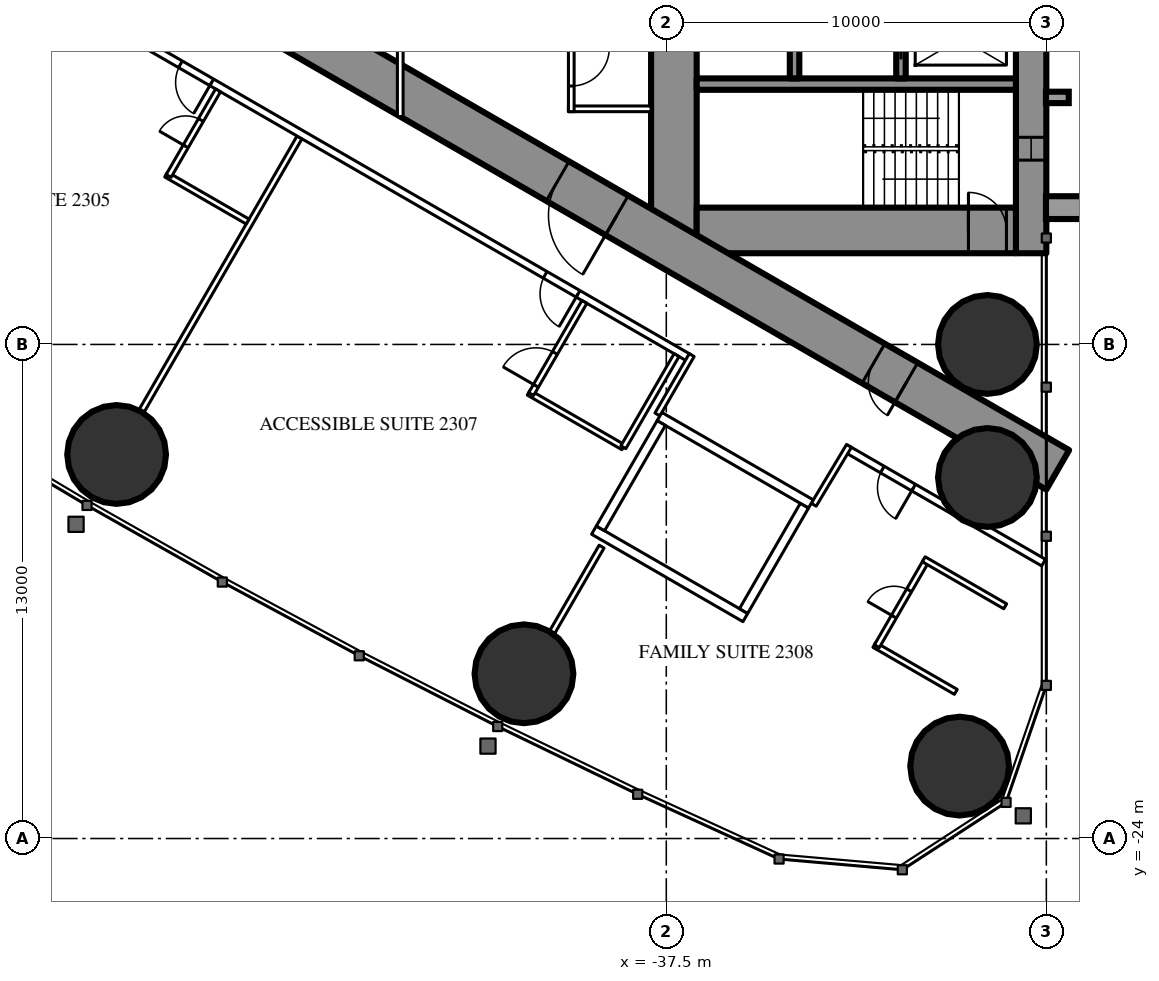
"""IFC4 building model, lengths in metres.
Left out: names, types, materials, properties, quantities, classifications, styles, units other than length and angle.
Written with IfcOpenShell. Run it as: python <this file> out.ifc"""

import sys

from ifc_helpers import new_model, si_unit, direction, frame, frame_2d, origin, origin_2d, place, context, subcontext, project, spatial, rectangle, hollow_circle, extrude, element, fill, save


model = new_model("IFC4")
c1 = context("Model", 3, precision=1e-05, world=origin(), true_north=direction((0.0, 1.0)))
c2 = subcontext(c1, "Body", "Model", "MODEL_VIEW")
j1 = project(units=[si_unit("LENGTHUNIT", "METRE"), si_unit("PLANEANGLEUNIT", "RADIAN")], contexts=[c1])
p1 = place(None, origin())
s1 = spatial("IfcSite", under=j1, at=p1, CompositionType="ELEMENT")
p2 = place(p1, origin())
s2 = spatial("IfcBuilding", under=s1, at=p2, CompositionType="ELEMENT")
p3 = place(p2, frame((0.0, 0.0, 90.6)))
s3 = spatial("IfcBuildingStorey", under=s2, at=p3, CompositionType="ELEMENT", Elevation=90.6)
for number, where, z_axis, x_axis in (
    (1, (-29.781, -22.095, 0.0), (0.0, 0.0, 1.0), (1.0, 0.0, 0.0)),
    (2, (-29.05, -11.0, 0.0), (0.0, 0.0, 1.0), (1.0, 0.0, 0.0)),
    (3, (-29.05, -14.5, 0.0), (0.0, 0.0, 1.0), (1.0, 0.0, 0.0)),
    (4, (-51.963, -13.895, 0.0), (0.0, 0.0, 1.0), (1.0, 0.0, 0.0)),
    (5, (-41.245, -19.666, 0.0), (0.0, 0.0, 1.0), (1.0, 0.0, 0.0)),
):
    element("IfcColumn", number, at=place(p3, frame(where, z_axis=z_axis, x_axis=x_axis)), inside=s3, PredefinedType="COLUMN", context=c2, shape_type="SweptSolid", body=[
        extrude(hollow_circle(Radius=1.3, WallThickness=0.1, at=origin_2d()), origin(), (0.0, 0.0, 1.0), 3.5),
    ])
p4 = place(p3, frame((-27.9, 8.6, 0.0), z_axis=(0.0, 0.0, 1.0), x_axis=(0.0, -1.0, 0.0)))
e6 = element("IfcWall", 6, at=p4, inside=s3, PredefinedType="SHEAR", context=c2, shape_type="SweptSolid", body=[
    extrude(rectangle(XDim=17.2, YDim=0.8, at=frame_2d((8.6, 0.0))), origin(), (0.0, 0.0, 1.0), 3.5),
])
p5 = place(p4, frame((2.45, 0.0, 0.6)))
e7 = element("IfcOpeningElement", 7, at=p5, cuts=e6, PredefinedType="OPENING", context=c2, shape_type="SweptSolid", body=[
    extrude(rectangle(XDim=0.6, YDim=2.1, at=frame_2d((0.3, 1.05))), frame((0.0, 0.41, 0.0), z_axis=(0.0, -1.0, 0.0), x_axis=(1.0, 0.0, 0.0)), (0.0, 0.0, 1.0), 0.82),
])
p6 = place(p4, frame((14.15, 0.0, 0.6)))
e8 = element("IfcOpeningElement", 8, at=p6, cuts=e6, PredefinedType="OPENING", context=c2, shape_type="SweptSolid", body=[
    extrude(rectangle(XDim=0.6, YDim=2.1, at=frame_2d((0.3, 1.05))), frame((0.0, 0.41, 0.0), z_axis=(0.0, -1.0, 0.0), x_axis=(1.0, 0.0, 0.0)), (0.0, 0.0, 1.0), 0.82),
])
p7 = place(p3, frame((-37.3, 8.6, 0.0), z_axis=(0.0, 0.0, 1.0), x_axis=(0.0, -1.0, 0.0)))
e9 = element("IfcWall", 9, at=p7, inside=s3, PredefinedType="SHEAR", context=c2, shape_type="SweptSolid", body=[
    extrude(rectangle(XDim=17.2, YDim=1.2, at=frame_2d((8.6, 0.0))), origin(), (0.0, 0.0, 1.0), 3.5),
])
p8 = place(p7, frame((7.7, 0.0, 0.0)))
e10 = element("IfcOpeningElement", 10, at=p8, cuts=e9, PredefinedType="OPENING", context=c2, shape_type="SweptSolid", body=[
    extrude(rectangle(XDim=1.8, YDim=2.2, at=frame_2d((0.9, 1.1))), frame((0.0, 0.61, 0.0), z_axis=(0.0, -1.0, 0.0), x_axis=(1.0, 0.0, 0.0)), (0.0, 0.0, 1.0), 1.22),
])
p9 = place(p3, frame((-28.3, -8.0, 0.0), z_axis=(0.0, 0.0, 1.0), x_axis=(-1.0, 0.0, 0.0)))
e11 = element("IfcWall", 11, at=p9, inside=s3, PredefinedType="SHEAR", context=c2, shape_type="SweptSolid", body=[
    extrude(rectangle(XDim=8.4, YDim=1.2, at=frame_2d((4.2, 0.0))), origin(), (0.0, 0.0, 1.0), 3.5),
])
p10 = place(p9, frame((0.25, 0.0, 0.0)))
e12 = element("IfcOpeningElement", 12, at=p10, cuts=e11, PredefinedType="OPENING", context=c2, shape_type="SweptSolid", body=[
    extrude(rectangle(XDim=1.0, YDim=2.2, at=frame_2d((0.5, 1.1))), frame((0.0, 0.61, 0.0), z_axis=(0.0, -1.0, 0.0), x_axis=(1.0, 0.0, 0.0)), (0.0, 0.0, 1.0), 1.22),
])
p11 = place(p3, frame((-28.3, -4.15, 0.0), z_axis=(0.0, 0.0, 1.0), x_axis=(-1.0, 0.0, 0.0)))
e13 = element("IfcWall", 13, at=p11, inside=s3, PredefinedType="SHEAR", context=c2, shape_type="SweptSolid", body=[
    extrude(rectangle(XDim=8.4, YDim=0.3, at=frame_2d((4.2, 0.0))), origin(), (0.0, 0.0, 1.0), 3.5),
])
p12 = place(p3, frame((-31.325, -1.9, 0.0), z_axis=(0.0, 0.0, 1.0), x_axis=(0.0, -1.0, 0.0)))
e14 = element("IfcWall", 14, at=p12, inside=s3, PredefinedType="SHEAR", context=c2, shape_type="SweptSolid", body=[
    extrude(rectangle(XDim=2.1, YDim=0.25, at=frame_2d((1.05, 0.0))), origin(), (0.0, 0.0, 1.0), 3.5),
])
p13 = place(p12, frame((0.5, 0.0, 0.0)))
e15 = element("IfcOpeningElement", 15, at=p13, cuts=e14, PredefinedType="OPENING", context=c2, shape_type="SweptSolid", body=[
    extrude(rectangle(XDim=1.1, YDim=2.2, at=frame_2d((0.55, 1.1))), frame((0.0, 0.135, 0.0), z_axis=(0.0, -1.0, 0.0), x_axis=(1.0, 0.0, 0.0)), (0.0, 0.0, 1.0), 0.27),
])
p14 = place(p3, frame((-34.125, -1.65, 0.0), z_axis=(0.0, 0.0, 1.0), x_axis=(0.0, -1.0, 0.0)))
e16 = element("IfcWall", 16, at=p14, inside=s3, PredefinedType="SHEAR", context=c2, shape_type="SweptSolid", body=[
    extrude(rectangle(XDim=2.35, YDim=0.25, at=frame_2d((1.175, 0.0))), origin(), (0.0, 0.0, 1.0), 3.5),
])
p15 = place(p14, frame((0.875, 0.0, 0.0)))
e17 = element("IfcOpeningElement", 17, at=p15, cuts=e16, PredefinedType="OPENING", context=c2, shape_type="SweptSolid", body=[
    extrude(rectangle(XDim=0.6, YDim=2.0, at=frame_2d((0.3, 1.0))), frame((0.0, 0.135, 0.0), z_axis=(0.0, -1.0, 0.0), x_axis=(1.0, 0.0, 0.0)), (0.0, 0.0, 1.0), 0.27),
])
p16 = place(p3, frame((-27.2, -14.3, 0.0), z_axis=(0.0, 0.0, 1.0), x_axis=(-0.866024021859, 0.500002393557, 0.0)))
e18 = element("IfcWall", 18, at=p16, inside=s3, PredefinedType="SHEAR", context=c2, shape_type="SweptSolid", body=[
    extrude(rectangle(XDim=27.907, YDim=1.2, at=frame_2d((13.954, 0.0))), origin(), (0.0, 0.0, 1.0), 3.5),
])
p17 = place(p16, frame((4.6, 0.0, 0.0)))
e19 = element("IfcOpeningElement", 19, at=p17, cuts=e18, PredefinedType="OPENING", context=c2, shape_type="SweptSolid", body=[
    extrude(rectangle(XDim=1.0, YDim=2.2, at=frame_2d((0.5, 1.1))), frame((0.0, 0.61, 0.0), z_axis=(0.0, -1.0, 0.0), x_axis=(1.0, 0.0, 0.0)), (0.0, 0.0, 1.0), 1.22),
])
p18 = place(p16, frame((13.395, 0.0, 0.0)))
e20 = element("IfcOpeningElement", 20, at=p18, cuts=e18, PredefinedType="OPENING", context=c2, shape_type="SweptSolid", body=[
    extrude(rectangle(XDim=1.8, YDim=2.2, at=frame_2d((0.9, 1.1))), frame((0.0, 0.61, 0.0), z_axis=(0.0, -1.0, 0.0), x_axis=(1.0, 0.0, 0.0)), (0.0, 0.0, 1.0), 1.22),
])
p19 = place(p3, frame((-47.151, -5.552, 0.0), z_axis=(0.0, 0.0, 1.0), x_axis=(-0.500003012045, -0.866023664773, 0.0)))
e21 = element("IfcWall", 21, at=p19, inside=s3, PredefinedType="PARTITIONING", context=c2, shape_type="SweptSolid", body=[
    extrude(rectangle(XDim=8.311, YDim=0.15, at=frame_2d((4.156, 0.0))), origin(), (0.0, 0.0, 1.0), 2.2),
])
p20 = place(p3, frame((-39.202, -16.32, 0.0), z_axis=(0.0, 0.0, 1.0), x_axis=(-0.49997716683, -0.86603858612, 0.0)))
e22 = element("IfcWall", 22, at=p20, inside=s3, PredefinedType="PARTITIONING", context=c2, shape_type="SweptSolid", body=[
    extrude(rectangle(XDim=2.6, YDim=0.15, at=frame_2d((1.3, 0.0))), origin(), (0.0, 0.0, 1.0), 3.25),
])
p21 = place(p3, frame((-27.572, -16.741, 0.0), z_axis=(0.0, 0.0, 1.0), x_axis=(-0.866024464444, 0.500001626982, 0.0)))
e23 = element("IfcWall", 23, at=p21, inside=s3, PredefinedType="PARTITIONING", context=c2, shape_type="SweptSolid", body=[
    extrude(rectangle(XDim=5.955, YDim=0.2, at=frame_2d((2.978, 0.0))), origin(), (0.0, 0.0, 1.0), 3.25),
])
p22 = place(p21, frame((3.95, 0.0, 0.0)))
e24 = element("IfcOpeningElement", 24, at=p22, cuts=e23, PredefinedType="OPENING", context=c2, shape_type="SweptSolid", body=[
    extrude(rectangle(XDim=0.95, YDim=2.2, at=frame_2d((0.475, 1.1))), frame((0.0, 0.11, 0.0), z_axis=(0.0, -1.0, 0.0), x_axis=(1.0, 0.0, 0.0)), (0.0, 0.0, 1.0), 0.22),
])
p23 = place(p3, frame((-36.92, -11.344, 0.0), z_axis=(0.0, 0.0, 1.0), x_axis=(-0.866028313256, 0.499994960614, 0.0)))
e25 = element("IfcWall", 25, at=p23, inside=s3, PredefinedType="PARTITIONING", context=c2, shape_type="SweptSolid", body=[
    extrude(rectangle(XDim=22.568, YDim=0.2, at=frame_2d((11.284, 0.0))), origin(), (0.0, 0.0, 1.0), 3.25),
])
p24 = place(p23, frame((14.481, 0.0, 0.0)))
e26 = element("IfcOpeningElement", 26, at=p24, cuts=e25, PredefinedType="OPENING", context=c2, shape_type="SweptSolid", body=[
    extrude(rectangle(XDim=0.95, YDim=2.2, at=frame_2d((0.475, 1.1))), frame((0.0, 0.11, 0.0), z_axis=(0.0, -1.0, 0.0), x_axis=(1.0, 0.0, 0.0)), (0.0, 0.0, 1.0), 0.22),
])
p25 = place(p23, frame((3.35, 0.0, 0.0)))
e27 = element("IfcOpeningElement", 27, at=p25, cuts=e25, PredefinedType="OPENING", context=c2, shape_type="SweptSolid", body=[
    extrude(rectangle(XDim=1.0, YDim=2.2, at=frame_2d((0.5, 1.1))), frame((0.0, 0.11, 0.0), z_axis=(0.0, -1.0, 0.0), x_axis=(1.0, 0.0, 0.0)), (0.0, 0.0, 1.0), 0.22),
])
p26 = place(p3, frame((-36.831, -11.28, 0.0), z_axis=(0.0, 0.0, 1.0), x_axis=(-0.499937177781, -0.866061671171, 0.0)))
e28 = element("IfcWall", 28, at=p26, inside=s3, PredefinedType="PARTITIONING", context=c2, shape_type="SweptSolid", body=[
    extrude(rectangle(XDim=1.804, YDim=0.15, at=frame_2d((0.902, 0.0))), origin(), (0.0, 0.0, 1.0), 3.25),
])
p27 = place(p3, frame((-33.621, -15.218, 0.0), z_axis=(0.0, 0.0, 1.0), x_axis=(0.514336634837, 0.857588377991, 0.0)))
e29 = element("IfcWall", 29, at=p27, inside=s3, PredefinedType="PARTITIONING", context=c2, shape_type="SweptSolid", body=[
    extrude(rectangle(XDim=1.805, YDim=0.15, at=frame_2d((0.903, 0.0))), origin(), (0.0, 0.0, 1.0), 3.25),
])
p28 = place(p3, frame((-48.516, -7.767, 0.0), z_axis=(0.0, 0.0, 1.0), x_axis=(-0.866031185235, 0.4999899861, 0.0)))
e30 = element("IfcWall", 30, at=p28, inside=s3, PredefinedType="PARTITIONING", context=c2, shape_type="SweptSolid", body=[
    extrude(rectangle(XDim=2.475, YDim=0.15, at=frame_2d((1.238, 0.0))), origin(), (0.0, 0.0, 1.0), 3.25),
])
p29 = place(p3, frame((-49.295, -4.315, 0.0), z_axis=(0.0, 0.0, 1.0), x_axis=(-0.499936506574, -0.866062058628, 0.0)))
e31 = element("IfcWall", 31, at=p29, inside=s3, PredefinedType="PARTITIONING", context=c2, shape_type="SweptSolid", body=[
    extrude(rectangle(XDim=2.6, YDim=0.15, at=frame_2d((1.3, 0.0))), origin(), (0.0, 0.0, 1.0), 3.25),
])
p30 = place(p29, frame((0.9, 0.0, 0.0)))
e32 = element("IfcOpeningElement", 32, at=p30, cuts=e31, PredefinedType="OPENING", context=c2, shape_type="SweptSolid", body=[
    extrude(rectangle(XDim=0.8, YDim=2.2, at=frame_2d((0.4, 1.1))), frame((0.0, 0.085, 0.0), z_axis=(0.0, -1.0, 0.0), x_axis=(1.0, 0.0, 0.0)), (0.0, 0.0, 1.0), 0.17),
])
p31 = place(p3, frame((-38.63, -13.705, 0.0), z_axis=(0.0, 0.0, 1.0), x_axis=(-0.866018712932, 0.500011588718, 0.0)))
e33 = element("IfcWall", 33, at=p31, inside=s3, PredefinedType="PARTITIONING", context=c2, shape_type="SweptSolid", body=[
    extrude(rectangle(XDim=2.875, YDim=0.15, at=frame_2d((1.438, 0.0))), origin(), (0.0, 0.0, 1.0), 3.25),
])
p32 = place(p3, frame((-39.655, -9.88, 0.0), z_axis=(0.0, 0.0, 1.0), x_axis=(-0.500049511043, -0.865996816683, 0.0)))
e34 = element("IfcWall", 34, at=p32, inside=s3, PredefinedType="PARTITIONING", context=c2, shape_type="SweptSolid", body=[
    extrude(rectangle(XDim=2.8, YDim=0.15, at=frame_2d((1.4, 0.0))), origin(), (0.0, 0.0, 1.0), 3.25),
])
p33 = place(p32, frame((1.55, 0.0, 0.0)))
e35 = element("IfcOpeningElement", 35, at=p33, cuts=e34, PredefinedType="OPENING", context=c2, shape_type="SweptSolid", body=[
    extrude(rectangle(XDim=1.0, YDim=2.2, at=frame_2d((0.5, 1.1))), frame((0.0, 0.085, 0.0), z_axis=(0.0, -1.0, 0.0), x_axis=(1.0, 0.0, 0.0)), (0.0, 0.0, 1.0), 0.17),
])
p34 = place(p3, frame((-37.23, -11.281, 0.0), z_axis=(0.0, 0.0, 1.0), x_axis=(-0.500049511043, -0.865996816683, 0.0)))
e36 = element("IfcWall", 36, at=p34, inside=s3, PredefinedType="PARTITIONING", context=c2, shape_type="SweptSolid", body=[
    extrude(rectangle(XDim=2.8, YDim=0.15, at=frame_2d((1.4, 0.0))), origin(), (0.0, 0.0, 1.0), 3.25),
])
p35 = place(p3, frame((-29.882, -20.142, 0.0), z_axis=(0.0, 0.0, 1.0), x_axis=(-0.866031185235, 0.4999899861, 0.0)))
e37 = element("IfcWall", 37, at=p35, inside=s3, PredefinedType="PARTITIONING", context=c2, shape_type="SweptSolid", body=[
    extrude(rectangle(XDim=2.475, YDim=0.15, at=frame_2d((1.238, 0.0))), origin(), (0.0, 0.0, 1.0), 3.25),
])
p36 = place(p3, frame((-30.66, -16.69, 0.0), z_axis=(0.0, 0.0, 1.0), x_axis=(-0.499936506574, -0.866062058628, 0.0)))
e38 = element("IfcWall", 38, at=p36, inside=s3, PredefinedType="PARTITIONING", context=c2, shape_type="SweptSolid", body=[
    extrude(rectangle(XDim=2.6, YDim=0.15, at=frame_2d((1.3, 0.0))), origin(), (0.0, 0.0, 1.0), 3.25),
])
p37 = place(p36, frame((0.9, 0.0, 0.0)))
e39 = element("IfcOpeningElement", 39, at=p37, cuts=e38, PredefinedType="OPENING", context=c2, shape_type="SweptSolid", body=[
    extrude(rectangle(XDim=0.8, YDim=2.2, at=frame_2d((0.4, 1.1))), frame((0.0, 0.085, 0.0), z_axis=(0.0, -1.0, 0.0), x_axis=(1.0, 0.0, 0.0)), (0.0, 0.0, 1.0), 0.17),
])
p38 = place(p3, frame((-28.582, -17.89, 0.0), z_axis=(0.0, 0.0, 1.0), x_axis=(-0.866073894602, 0.499916002032, 0.0)))
e40 = element("IfcWall", 40, at=p38, inside=s3, PredefinedType="PARTITIONING", context=c2, shape_type="SweptSolid", body=[
    extrude(rectangle(XDim=2.475, YDim=0.15, at=frame_2d((1.238, 0.0))), origin(), (0.0, 0.0, 1.0), 3.25),
])
p39 = place(p3, frame((-37.9, -4.8, 0.0), z_axis=(0.0, 0.0, 1.0), x_axis=(-1.0, 0.0, 0.0)))
e41 = element("IfcWall", 41, at=p39, inside=s3, PredefinedType="PARTITIONING", context=c2, shape_type="SweptSolid", body=[
    extrude(rectangle(XDim=2.175, YDim=0.15, at=frame_2d((1.087, 0.0))), origin(), (0.0, 0.0, 1.0), 3.25),
])
p40 = place(p3, frame((-40.0, -2.525, 0.0), z_axis=(0.0, 0.0, 1.0), x_axis=(0.0, -1.0, 0.0)))
e42 = element("IfcWall", 42, at=p40, inside=s3, PredefinedType="PARTITIONING", context=c2, shape_type="SweptSolid", body=[
    extrude(rectangle(XDim=2.35, YDim=0.15, at=frame_2d((1.175, 0.0))), origin(), (0.0, 0.0, 1.0), 3.25),
])
p41 = place(p40, frame((0.675, 0.0, 0.0)))
e43 = element("IfcOpeningElement", 43, at=p41, cuts=e42, PredefinedType="OPENING", context=c2, shape_type="SweptSolid", body=[
    extrude(rectangle(XDim=1.0, YDim=2.2, at=frame_2d((0.5, 1.1))), frame((0.0, 0.085, 0.0), z_axis=(0.0, -1.0, 0.0), x_axis=(1.0, 0.0, 0.0)), (0.0, 0.0, 1.0), 0.17),
])
p42 = place(p3, frame((-44.5, 5.005, 0.0), z_axis=(0.0, 0.0, 1.0), x_axis=(0.0, -1.0, 0.0)))
e44 = element("IfcWall", 44, at=p42, inside=s3, PredefinedType="PARTITIONING", context=c2, shape_type="SweptSolid", body=[
    extrude(rectangle(XDim=10.009, YDim=0.15, at=frame_2d((5.005, 0.0))), origin(), (0.0, 0.0, 1.0), 2.45),
])
p43 = place(p42, frame((2.002, 0.0, 0.0)))
e45 = element("IfcOpeningElement", 45, at=p43, cuts=e44, PredefinedType="OPENING", context=c2, shape_type="SweptSolid", body=[
    extrude(rectangle(XDim=1.0, YDim=2.2, at=frame_2d((0.5, 1.1))), frame((0.0, 0.085, 0.0), z_axis=(0.0, -1.0, 0.0), x_axis=(1.0, 0.0, 0.0)), (0.0, 0.0, 1.0), 0.17),
])
p44 = place(p42, frame((7.007, 0.0, 0.0)))
e46 = element("IfcOpeningElement", 46, at=p44, cuts=e44, PredefinedType="OPENING", context=c2, shape_type="SweptSolid", body=[
    extrude(rectangle(XDim=1.0, YDim=2.2, at=frame_2d((0.5, 1.1))), frame((0.0, 0.085, 0.0), z_axis=(0.0, -1.0, 0.0), x_axis=(1.0, 0.0, 0.0)), (0.0, 0.0, 1.0), 0.17),
])
p45 = place(p3, frame((-33.696, -15.197, 0.0), z_axis=(0.0, 0.0, 1.0), x_axis=(-0.865976953817, 0.500083908417, 0.0)))
e47 = element("IfcWall", 47, at=p45, inside=s3, PredefinedType="PARTITIONING", context=c2, shape_type="SweptSolid", body=[
    extrude(rectangle(XDim=4.599, YDim=0.25, at=frame_2d((2.3, 0.0))), origin(), (0.0, 0.0, 1.0), 3.25),
])
p46 = place(p3, frame((-35.42, -18.186, 0.0), z_axis=(0.0, 0.0, 1.0), x_axis=(-0.865990227814, 0.50006092162, 0.0)))
e48 = element("IfcWall", 48, at=p46, inside=s3, PredefinedType="PARTITIONING", context=c2, shape_type="SweptSolid", body=[
    extrude(rectangle(XDim=4.6, YDim=0.25, at=frame_2d((2.3, 0.0))), origin(), (0.0, 0.0, 1.0), 3.25),
])
p47 = place(p3, frame((-33.866, -15.243, 0.0), z_axis=(0.0, 0.0, 1.0), x_axis=(-0.499929347863, -0.866066190972, 0.0)))
e49 = element("IfcWall", 49, at=p47, inside=s3, PredefinedType="PARTITIONING", context=c2, shape_type="SweptSolid", body=[
    extrude(rectangle(XDim=3.201, YDim=0.25, at=frame_2d((1.6, 0.0))), origin(), (0.0, 0.0, 1.0), 3.25),
])
p48 = place(p3, frame((-37.633, -13.068, 0.0), z_axis=(0.0, 0.0, 1.0), x_axis=(-0.499872130319, -0.866099216793, 0.0)))
e50 = element("IfcWall", 50, at=p48, inside=s3, PredefinedType="PARTITIONING", context=c2, shape_type="SweptSolid", body=[
    extrude(rectangle(XDim=3.2, YDim=0.25, at=frame_2d((1.6, 0.0))), origin(), (0.0, 0.0, 1.0), 3.25),
])
p49 = place(p30, origin())
e51 = element("IfcDoor", 51, at=p49, inside=s3, OperationType="SINGLE_SWING_RIGHT", PredefinedType="DOOR", context=c2, shape_type="SweptSolid", body=[
    extrude(rectangle(XDim=0.8, YDim=2.2, at=frame_2d((0.4, 1.1))), frame((0.0, 0.025, 0.0), z_axis=(0.0, -1.0, 0.0), x_axis=(1.0, 0.0, 0.0)), (0.0, 0.0, 1.0), 0.05),
])
fill(e32, e51)
p50 = place(p24, origin())
e52 = element("IfcDoor", 52, at=p50, inside=s3, OperationType="SINGLE_SWING_LEFT", PredefinedType="DOOR", context=c2, shape_type="SweptSolid", body=[
    extrude(rectangle(XDim=0.95, YDim=2.2, at=frame_2d((0.475, 1.1))), frame((0.0, 0.025, 0.0), z_axis=(0.0, -1.0, 0.0), x_axis=(1.0, 0.0, 0.0)), (0.0, 0.0, 1.0), 0.05),
])
fill(e26, e52)
p51 = place(p33, origin())
e53 = element("IfcDoor", 53, at=p51, inside=s3, OperationType="SINGLE_SWING_RIGHT", PredefinedType="DOOR", context=c2, shape_type="SweptSolid", body=[
    extrude(rectangle(XDim=1.0, YDim=2.2, at=frame_2d((0.5, 1.1))), frame((0.0, 0.025, 0.0), z_axis=(0.0, -1.0, 0.0), x_axis=(1.0, 0.0, 0.0)), (0.0, 0.0, 1.0), 0.05),
])
fill(e35, e53)
p52 = place(p25, origin())
e54 = element("IfcDoor", 54, at=p52, inside=s3, OperationType="SINGLE_SWING_LEFT", PredefinedType="DOOR", context=c2, shape_type="SweptSolid", body=[
    extrude(rectangle(XDim=1.0, YDim=2.2, at=frame_2d((0.5, 1.1))), frame((0.0, 0.025, 0.0), z_axis=(0.0, -1.0, 0.0), x_axis=(1.0, 0.0, 0.0)), (0.0, 0.0, 1.0), 0.05),
])
fill(e27, e54)
p53 = place(p37, origin())
e55 = element("IfcDoor", 55, at=p53, inside=s3, OperationType="SINGLE_SWING_RIGHT", PredefinedType="DOOR", context=c2, shape_type="SweptSolid", body=[
    extrude(rectangle(XDim=0.8, YDim=2.2, at=frame_2d((0.4, 1.1))), frame((0.0, 0.025, 0.0), z_axis=(0.0, -1.0, 0.0), x_axis=(1.0, 0.0, 0.0)), (0.0, 0.0, 1.0), 0.05),
])
fill(e39, e55)
p54 = place(p22, origin())
e56 = element("IfcDoor", 56, at=p54, inside=s3, OperationType="SINGLE_SWING_LEFT", PredefinedType="DOOR", context=c2, shape_type="SweptSolid", body=[
    extrude(rectangle(XDim=0.95, YDim=2.2, at=frame_2d((0.475, 1.1))), frame((0.0, 0.025, 0.0), z_axis=(0.0, -1.0, 0.0), x_axis=(1.0, 0.0, 0.0)), (0.0, 0.0, 1.0), 0.05),
])
fill(e24, e56)
p55 = place(p41, origin())
e57 = element("IfcDoor", 57, at=p55, inside=s3, OperationType="SINGLE_SWING_LEFT", PredefinedType="DOOR", context=c2, shape_type="SweptSolid", body=[
    extrude(rectangle(XDim=1.0, YDim=2.2, at=frame_2d((0.5, 1.1))), frame((0.0, 0.025, 0.0), z_axis=(0.0, -1.0, 0.0), x_axis=(1.0, 0.0, 0.0)), (0.0, 0.0, 1.0), 0.05),
])
fill(e43, e57)
p56 = place(p17, origin())
e58 = element("IfcDoor", 58, at=p56, inside=s3, OperationType="SINGLE_SWING_LEFT", PredefinedType="DOOR", context=c2, shape_type="SweptSolid", body=[
    extrude(rectangle(XDim=1.0, YDim=2.2, at=frame_2d((0.5, 1.1))), frame((0.0, 0.025, 0.0), z_axis=(0.0, -1.0, 0.0), x_axis=(1.0, 0.0, 0.0)), (0.0, 0.0, 1.0), 0.05),
])
fill(e19, e58)
p57 = place(p18, origin())
e59 = element("IfcDoor", 59, at=p57, inside=s3, OperationType="DOUBLE_DOOR_SINGLE_SWING", PredefinedType="DOOR", context=c2, shape_type="SweptSolid", body=[
    extrude(rectangle(XDim=1.8, YDim=2.2, at=frame_2d((0.9, 1.1))), frame((0.0, 0.025, 0.0), z_axis=(0.0, -1.0, 0.0), x_axis=(1.0, 0.0, 0.0)), (0.0, 0.0, 1.0), 0.05),
])
fill(e20, e59)
p58 = place(p10, origin())
e60 = element("IfcDoor", 60, at=p58, inside=s3, OperationType="SINGLE_SWING_RIGHT", PredefinedType="DOOR", context=c2, shape_type="SweptSolid", body=[
    extrude(rectangle(XDim=1.0, YDim=2.2, at=frame_2d((0.5, 1.1))), frame((0.0, 0.025, 0.0), z_axis=(0.0, -1.0, 0.0), x_axis=(1.0, 0.0, 0.0)), (0.0, 0.0, 1.0), 0.05),
])
fill(e12, e60)
p59 = place(p13, origin())
e61 = element("IfcDoor", 61, at=p59, inside=s3, OperationType="SLIDING_TO_LEFT", PredefinedType="USERDEFINED", context=c2, shape_type="SweptSolid", body=[
    extrude(rectangle(XDim=1.1, YDim=2.2, at=frame_2d((0.55, 1.1))), frame((0.0, 0.025, 0.0), z_axis=(0.0, -1.0, 0.0), x_axis=(1.0, 0.0, 0.0)), (0.0, 0.0, 1.0), 0.05),
])
fill(e15, e61)
p60 = place(p6, origin())
e62 = element("IfcWindow", 62, at=p60, inside=s3, PartitioningType="SINGLE_PANEL", PredefinedType="WINDOW", context=c2, shape_type="SweptSolid", body=[
    extrude(rectangle(XDim=0.6, YDim=2.1, at=frame_2d((0.3, 1.05))), frame((0.0, 0.03, 0.0), z_axis=(0.0, -1.0, 0.0), x_axis=(1.0, 0.0, 0.0)), (0.0, 0.0, 1.0), 0.06),
])
fill(e8, e62)
save(model, sys.argv[1])
